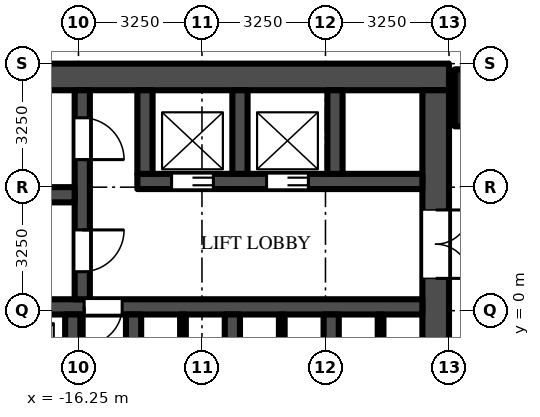
"""IFC4 building model, lengths in metres.
Left out: names, types, materials, properties, quantities, classifications, styles, units other than length and angle.
Written with IfcOpenShell. Run it as: python <this file> out.ifc"""

import sys

from ifc_helpers import new_model, si_unit, direction, frame, frame_2d, origin, origin_2d, place, context, subcontext, project, spatial, rectangle, extrude, source, transform, mapped, element, fill, save


model = new_model("IFC4")
c1 = context("Model", 3, precision=1e-05, world=origin(), true_north=direction((0.0, 1.0)))
c2 = subcontext(c1, "Body", "Model", "MODEL_VIEW")
j1 = project(units=[si_unit("LENGTHUNIT", "METRE"), si_unit("PLANEANGLEUNIT", "RADIAN")], contexts=[c1])
p1 = place(None, origin())
s1 = spatial("IfcSite", under=j1, at=p1, CompositionType="ELEMENT")
p2 = place(p1, origin())
s2 = spatial("IfcBuilding", under=s1, at=p2, CompositionType="ELEMENT")
p3 = place(p2, frame((0.0, 0.0, 19.0)))
s3 = spatial("IfcBuildingStorey", under=s2, at=p3, CompositionType="ELEMENT", Elevation=19.0)
m1 = source(origin(), c2, "Body", "SweptSolid", [
    extrude(rectangle(XDim=1.5, YDim=1.5, at=origin_2d()), origin(), (0.0, 0.0, 1.0), 5.0),
])
p4 = place(p3, frame((-5.6, 5.6, 0.0), z_axis=(0.0, 0.0, 1.0), x_axis=(1.0, 0.0, 0.0)))
e1 = element("IfcColumn", 1, at=p4, inside=s3, PredefinedType="COLUMN", context=c2, shape_type="MappedRepresentation", body=[
    mapped(m1, transform((0.0, 0.0, 0.0))),
])
m2 = source(origin(), c2, "Body", "SweptSolid", [
    extrude(rectangle(XDim=16.25, YDim=0.7, at=frame_2d((8.125, 0.0))), origin(), (0.0, 0.0, 1.0), 4.7),
])
p5 = place(p3, frame((-6.5, 6.15, 0.0), z_axis=(0.0, 0.0, 1.0), x_axis=(-1.0, 0.0, 0.0)))
e2 = element("IfcWall", 2, at=p5, inside=s3, PredefinedType="SHEAR", context=c2, shape_type="MappedRepresentation", body=[
    mapped(m2, transform((0.0, 0.0, 0.0))),
])
m3 = source(origin(), c2, "Body", "SweptSolid", [
    extrude(rectangle(XDim=9.05, YDim=0.7, at=frame_2d((4.525, 0.0))), origin(), (0.0, 0.0, 1.0), 4.7),
])
p6 = place(p3, frame((-6.85, 5.8, 0.0), z_axis=(0.0, 0.0, 1.0), x_axis=(0.0, -1.0, 0.0)))
e3 = element("IfcWall", 3, at=p6, inside=s3, PredefinedType="SHEAR", context=c2, shape_type="MappedRepresentation", body=[
    mapped(m3, transform((0.0, 0.0, 0.0))),
])
m4 = source(origin(), c2, "Body", "SweptSolid", [
    extrude(rectangle(XDim=1.8, YDim=2.1, at=frame_2d((0.9, 1.05))), frame((0.0, 0.36, 0.0), z_axis=(0.0, -1.0, 0.0), x_axis=(1.0, 0.0, 0.0)), (0.0, 0.0, 1.0), 0.72),
])
p7 = place(p6, frame((3.15, 0.0, 0.0)))
e4 = element("IfcOpeningElement", 4, at=p7, cuts=e3, PredefinedType="OPENING", context=c2, shape_type="MappedRepresentation", body=[
    mapped(m4, transform((0.0, 0.0, 0.0))),
])
m5 = source(origin(), c2, "Body", "SweptSolid", [
    extrude(rectangle(XDim=7.5, YDim=0.4, at=frame_2d((3.75, 0.0))), origin(), (0.0, 0.0, 1.0), 4.7),
])
p8 = place(p3, frame((-7.2, 3.4, 0.0), z_axis=(0.0, 0.0, 1.0), x_axis=(-1.0, 0.0, 0.0)))
e5 = element("IfcWall", 5, at=p8, inside=s3, PredefinedType="SHEAR", context=c2, shape_type="MappedRepresentation", body=[
    mapped(m5, transform((0.0, 0.0, 0.0))),
])
m6 = source(origin(), c2, "Body", "SweptSolid", [
    extrude(rectangle(XDim=1.1, YDim=2.1, at=frame_2d((0.55, 1.05))), frame((0.0, 0.21, 0.0), z_axis=(0.0, -1.0, 0.0), x_axis=(1.0, 0.0, 0.0)), (0.0, 0.0, 1.0), 0.42),
])
p9 = place(p8, frame((3.0, 0.0, 0.0)))
e6 = element("IfcOpeningElement", 6, at=p9, cuts=e5, PredefinedType="OPENING", context=c2, shape_type="MappedRepresentation", body=[
    mapped(m6, transform((0.0, 0.0, 0.0))),
])
p10 = place(p8, frame((5.5, 0.0, 0.0)))
e7 = element("IfcOpeningElement", 7, at=p10, cuts=e5, PredefinedType="OPENING", context=c2, shape_type="MappedRepresentation", body=[
    mapped(m6, transform((0.0, 0.0, 0.0))),
])
m7 = source(origin(), c2, "Body", "SweptSolid", [
    extrude(rectangle(XDim=14.85, YDim=0.4, at=frame_2d((7.425, 0.0))), origin(), (0.0, 0.0, 1.0), 4.7),
])
p11 = place(p3, frame((-7.2, 0.1, 0.0), z_axis=(0.0, 0.0, 1.0), x_axis=(-1.0, 0.0, 0.0)))
e8 = element("IfcWall", 8, at=p11, inside=s3, PredefinedType="SHEAR", context=c2, shape_type="MappedRepresentation", body=[
    mapped(m7, transform((0.0, 0.0, 0.0))),
])
m8 = source(origin(), c2, "Body", "SweptSolid", [
    extrude(rectangle(XDim=1.0, YDim=2.1, at=frame_2d((0.5, 1.05))), frame((0.0, 0.21, 0.0), z_axis=(0.0, -1.0, 0.0), x_axis=(1.0, 0.0, 0.0)), (0.0, 0.0, 1.0), 0.42),
])
p12 = place(p11, frame((7.9, 0.0, 0.0)))
e9 = element("IfcOpeningElement", 9, at=p12, cuts=e8, PredefinedType="OPENING", context=c2, shape_type="MappedRepresentation", body=[
    mapped(m8, transform((0.0, 0.0, 0.0))),
])
m9 = source(origin(), c2, "Body", "SweptSolid", [
    extrude(rectangle(XDim=5.5, YDim=0.4, at=frame_2d((2.75, 0.0))), origin(), (0.0, 0.0, 1.0), 4.7),
])
p13 = place(p3, frame((-16.15, 5.8, 0.0), z_axis=(0.0, 0.0, 1.0), x_axis=(0.0, -1.0, 0.0)))
e10 = element("IfcWall", 10, at=p13, inside=s3, PredefinedType="SHEAR", context=c2, shape_type="MappedRepresentation", body=[
    mapped(m9, transform((0.0, 0.0, 0.0))),
])
p14 = place(p13, frame((0.725, 0.0, 0.0)))
e11 = element("IfcOpeningElement", 11, at=p14, cuts=e10, PredefinedType="OPENING", context=c2, shape_type="MappedRepresentation", body=[
    mapped(m6, transform((0.0, 0.0, 0.0))),
])
p15 = place(p13, frame((3.675, 0.0, 0.0)))
e12 = element("IfcOpeningElement", 12, at=p15, cuts=e10, PredefinedType="OPENING", context=c2, shape_type="MappedRepresentation", body=[
    mapped(m6, transform((0.0, 0.0, 0.0))),
])
m10 = source(origin(), c2, "Body", "SweptSolid", [
    extrude(rectangle(XDim=5.7, YDim=0.4, at=frame_2d((2.85, 0.0))), origin(), (0.0, 0.0, 1.0), 4.7),
])
p16 = place(p3, frame((-16.35, 3.05, 0.0), z_axis=(0.0, 0.0, 1.0), x_axis=(-1.0, 0.0, 0.0)))
e13 = element("IfcWall", 13, at=p16, inside=s3, PredefinedType="SHEAR", context=c2, shape_type="MappedRepresentation", body=[
    mapped(m10, transform((0.0, 0.0, 0.0))),
])
m11 = source(origin(), c2, "Body", "SweptSolid", [
    extrude(rectangle(XDim=2.2, YDim=0.4, at=frame_2d((1.1, 0.0))), origin(), (0.0, 0.0, 1.0), 4.7),
])
for number, where, z_axis, x_axis in (
    (14, (-9.5, 5.8, 0.0), (0.0, 0.0, 1.0), (0.0, -1.0, 0.0)),
    (15, (-12.0, 5.8, 0.0), (0.0, 0.0, 1.0), (0.0, -1.0, 0.0)),
    (16, (-14.5, 5.8, 0.0), (0.0, 0.0, 1.0), (0.0, -1.0, 0.0)),
):
    element("IfcWall", number, at=place(p3, frame(where, z_axis=z_axis, x_axis=x_axis)), inside=s3, PredefinedType="SHEAR", context=c2, shape_type="MappedRepresentation", body=[
        mapped(m11, transform((0.0, 0.0, 0.0))),
    ])
m12 = source(origin(), c2, "Body", "SweptSolid", [
    extrude(rectangle(XDim=2.45, YDim=0.4, at=frame_2d((1.225, 0.0))), origin(), (0.0, 0.0, 1.0), 4.7),
])
for number, where, z_axis, x_axis in (
    (17, (-9.6, -0.1, 0.0), (0.0, 0.0, 1.0), (0.0, -1.0, 0.0)),
    (18, (-12.2, -0.1, 0.0), (0.0, 0.0, 1.0), (0.0, -1.0, 0.0)),
    (19, (-14.8, -0.1, 0.0), (0.0, 0.0, 1.0), (0.0, -1.0, 0.0)),
    (20, (-16.4, -0.1, 0.0), (0.0, 0.0, 1.0), (0.0, -1.0, 0.0)),
):
    element("IfcWall", number, at=place(p3, frame(where, z_axis=z_axis, x_axis=x_axis)), inside=s3, PredefinedType="SHEAR", context=c2, shape_type="MappedRepresentation", body=[
        mapped(m12, transform((0.0, 0.0, 0.0))),
    ])
m13 = source(origin(), c2, "Body", "SweptSolid", [
    extrude(rectangle(XDim=2.45, YDim=0.15, at=frame_2d((1.225, 0.0))), origin(), (0.0, 0.0, 1.0), 4.7),
])
for number, where, z_axis, x_axis in (
    (21, (-8.3, -0.1, 0.0), (0.0, 0.0, 1.0), (0.0, -1.0, 0.0)),
    (22, (-10.9, -0.1, 0.0), (0.0, 0.0, 1.0), (0.0, -1.0, 0.0)),
    (23, (-13.5, -0.1, 0.0), (0.0, 0.0, 1.0), (0.0, -1.0, 0.0)),
):
    element("IfcWall", number, at=place(p3, frame(where, z_axis=z_axis, x_axis=x_axis)), inside=s3, PredefinedType="PARTITIONING", context=c2, shape_type="MappedRepresentation", body=[
        mapped(m13, transform((0.0, 0.0, 0.0))),
    ])
m14 = source(origin(), c2, "Body", "SweptSolid", [
    extrude(rectangle(XDim=1.1, YDim=2.1, at=frame_2d((0.55, 1.05))), frame((0.0, 0.025, 0.0), z_axis=(0.0, -1.0, 0.0), x_axis=(1.0, 0.0, 0.0)), (0.0, 0.0, 1.0), 0.05),
])
p17 = place(p9, origin())
e24 = element("IfcDoor", 24, at=p17, inside=s3, OperationType="DOUBLE_DOOR_SLIDING", PredefinedType="DOOR", context=c2, shape_type="MappedRepresentation", body=[
    mapped(m14, transform((0.0, 0.0, 0.0))),
])
fill(e6, e24)
p18 = place(p10, origin())
e25 = element("IfcDoor", 25, at=p18, inside=s3, OperationType="DOUBLE_DOOR_SLIDING", PredefinedType="DOOR", context=c2, shape_type="MappedRepresentation", body=[
    mapped(m14, transform((0.0, 0.0, 0.0))),
])
fill(e7, e25)
m15 = source(origin(), c2, "Body", "SweptSolid", [
    extrude(rectangle(XDim=1.8, YDim=2.1, at=frame_2d((0.9, 1.05))), frame((0.0, -0.275, 0.0), z_axis=(0.0, -1.0, 0.0), x_axis=(1.0, 0.0, 0.0)), (0.0, 0.0, 1.0), 0.05),
])
p19 = place(p7, origin())
e26 = element("IfcDoor", 26, at=p19, inside=s3, OperationType="DOUBLE_DOOR_SINGLE_SWING", PredefinedType="DOOR", context=c2, shape_type="MappedRepresentation", body=[
    mapped(m15, transform((0.0, 0.0, 0.0))),
])
fill(e4, e26)
p20 = place(p14, origin())
e27 = element("IfcDoor", 27, at=p20, inside=s3, OperationType="SINGLE_SWING_RIGHT", PredefinedType="DOOR", context=c2, shape_type="MappedRepresentation", body=[
    mapped(m14, transform((0.0, 0.0, 0.0))),
])
fill(e11, e27)
p21 = place(p15, origin())
e28 = element("IfcDoor", 28, at=p21, inside=s3, OperationType="SINGLE_SWING_LEFT", PredefinedType="DOOR", context=c2, shape_type="MappedRepresentation", body=[
    mapped(m14, transform((0.0, 0.0, 0.0))),
])
fill(e12, e28)
m16 = source(origin(), c2, "Body", "SweptSolid", [
    extrude(rectangle(XDim=1.0, YDim=2.1, at=frame_2d((0.5, 1.05))), frame((0.0, 0.025, 0.0), z_axis=(0.0, -1.0, 0.0), x_axis=(1.0, 0.0, 0.0)), (0.0, 0.0, 1.0), 0.05),
])
p22 = place(p12, origin())
e29 = element("IfcDoor", 29, at=p22, inside=s3, OperationType="SINGLE_SWING_RIGHT", PredefinedType="DOOR", context=c2, shape_type="MappedRepresentation", body=[
    mapped(m16, transform((0.0, 0.0, 0.0))),
])
fill(e9, e29)
save(model, sys.argv[1])
